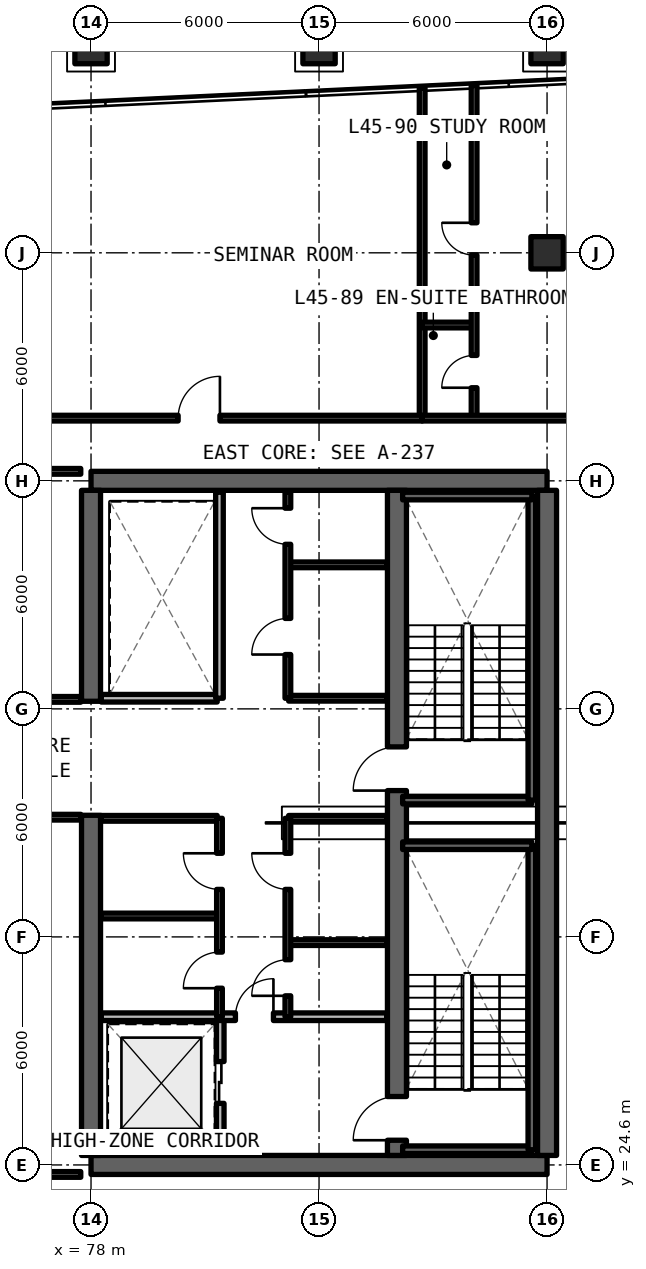
"""IFC4 building model, lengths in metres.
Left out: names, types, materials, properties, quantities, classifications, styles, units other than length and angle.
Written with IfcOpenShell. Run it as: python <this file> out.ifc"""

import sys

from ifc_helpers import new_model, si_unit, direction, frame, frame_2d, origin, origin_2d, place, context, subcontext, project, spatial, rectangle, extrude, element, fill, save


model = new_model("IFC4")
c1 = context("Model", 3, precision=1e-05, world=origin(), true_north=direction((0.0, 1.0)))
c2 = subcontext(c1, "Body", "Model", "MODEL_VIEW")
j1 = project(units=[si_unit("LENGTHUNIT", "METRE"), si_unit("PLANEANGLEUNIT", "RADIAN")], contexts=[c1])
p1 = place(None, origin())
s1 = spatial("IfcSite", under=j1, at=p1, CompositionType="ELEMENT")
p2 = place(p1, origin())
s2 = spatial("IfcBuilding", under=s1, at=p2, CompositionType="ELEMENT")
p3 = place(p2, frame((0.0, 0.0, 162.03)))
s3 = spatial("IfcBuildingStorey", under=s2, at=p3, CompositionType="ELEMENT", Elevation=162.03)
for number, where, z_axis, x_axis in (
    (1, (78.0, 24.6, 0.0), (0.0, 0.0, 1.0), (1.0, 0.0, 0.0)),
    (2, (90.0, 42.6, 0.0), (0.0, 0.0, 1.0), (-1.0, 0.0, 0.0)),
):
    element("IfcWall", number, at=place(p3, frame(where, z_axis=z_axis, x_axis=x_axis)), inside=s3, PredefinedType="SHEAR", context=c2, shape_type="SweptSolid", body=[
        extrude(rectangle(XDim=12.0, YDim=0.5, at=frame_2d((6.0, 0.0))), origin(), (0.0, 0.0, 1.0), 3.63),
    ])
p4 = place(p3, frame((90.0, 24.85, 0.0), z_axis=(0.0, 0.0, 1.0), x_axis=(0.0, 1.0, 0.0)))
e3 = element("IfcWall", 3, at=p4, inside=s3, PredefinedType="SHEAR", context=c2, shape_type="SweptSolid", body=[
    extrude(rectangle(XDim=17.5, YDim=0.5, at=frame_2d((8.75, 0.0))), origin(), (0.0, 0.0, 1.0), 3.63),
])
p5 = place(p3, frame((78.0, 24.85, 0.0), z_axis=(0.0, 0.0, 1.0), x_axis=(0.0, 1.0, 0.0)))
e4 = element("IfcWall", 4, at=p5, inside=s3, PredefinedType="SHEAR", context=c2, shape_type="SweptSolid", body=[
    extrude(rectangle(XDim=8.95, YDim=0.5, at=frame_2d((4.475, 0.0))), origin(), (0.0, 0.0, 1.0), 3.63),
])
p6 = place(p3, frame((78.0, 36.8, 0.0), z_axis=(0.0, 0.0, 1.0), x_axis=(0.0, 1.0, 0.0)))
e5 = element("IfcWall", 5, at=p6, inside=s3, PredefinedType="SHEAR", context=c2, shape_type="SweptSolid", body=[
    extrude(rectangle(XDim=5.55, YDim=0.5, at=frame_2d((2.775, 0.0))), origin(), (0.0, 0.0, 1.0), 3.63),
])
p7 = place(p3, frame((86.05, 24.85, 0.0), z_axis=(0.0, 0.0, 1.0), x_axis=(0.0, 1.0, 0.0)))
e6 = element("IfcWall", 6, at=p7, inside=s3, PredefinedType="SHEAR", context=c2, shape_type="SweptSolid", body=[
    extrude(rectangle(XDim=17.5, YDim=0.5, at=frame_2d((8.75, 0.0))), origin(), (0.0, 0.0, 1.0), 3.63),
])
p8 = place(p7, frame((0.4, 0.0, 0.0)))
e7 = element("IfcOpeningElement", 7, at=p8, cuts=e6, PredefinedType="OPENING", context=c2, shape_type="SweptSolid", body=[
    extrude(rectangle(XDim=1.15, YDim=2.15, at=frame_2d((0.575, 1.075))), frame((0.0, 0.26, 0.0), z_axis=(0.0, -1.0, 0.0), x_axis=(1.0, 0.0, 0.0)), (0.0, 0.0, 1.0), 0.52),
])
p9 = place(p7, frame((9.6, 0.0, 0.0)))
e8 = element("IfcOpeningElement", 8, at=p9, cuts=e6, PredefinedType="OPENING", context=c2, shape_type="SweptSolid", body=[
    extrude(rectangle(XDim=1.15, YDim=2.15, at=frame_2d((0.575, 1.075))), frame((0.0, 0.26, 0.0), z_axis=(0.0, -1.0, 0.0), x_axis=(1.0, 0.0, 0.0)), (0.0, 0.0, 1.0), 0.52),
])
for number, where, z_axis, x_axis in (
    (9, (90.0, 48.6, 0.0), (0.0, 0.0, 1.0), (1.0, 0.0, 0.0)),
    (10, (78.0, 54.0, 0.0), (0.0, 0.0, 1.0), (1.0, 0.0, 0.0)),
    (11, (84.0, 54.0, 0.0), (0.0, 0.0, 1.0), (1.0, 0.0, 0.0)),
    (12, (90.0, 54.0, 0.0), (0.0, 0.0, 1.0), (1.0, 0.0, 0.0)),
):
    element("IfcColumn", number, at=place(p3, frame(where, z_axis=z_axis, x_axis=x_axis)), inside=s3, PredefinedType="COLUMN", context=c2, shape_type="SweptSolid", body=[
        extrude(rectangle(XDim=0.85, YDim=0.85, at=origin_2d()), origin(), (0.0, 0.0, 1.0), 3.63),
    ])
p10 = place(p3, frame((81.4, 24.92, 0.0), z_axis=(0.0, 0.0, 1.0), x_axis=(0.0, 1.0, 0.0)))
e13 = element("IfcWall", 13, at=p10, inside=s3, PredefinedType="SOLIDWALL", context=c2, shape_type="SweptSolid", body=[
    extrude(rectangle(XDim=3.58, YDim=0.2, at=frame_2d((1.79, 0.0))), origin(), (0.0, 0.0, 1.0), 2.63),
])
p11 = place(p10, frame((1.3, 0.0, 0.0)))
e14 = element("IfcOpeningElement", 14, at=p11, cuts=e13, PredefinedType="OPENING", context=c2, shape_type="SweptSolid", body=[
    extrude(rectangle(XDim=1.1, YDim=2.2, at=frame_2d((0.55, 1.1))), frame((0.0, 0.11, 0.0), z_axis=(0.0, -1.0, 0.0), x_axis=(1.0, 0.0, 0.0)), (0.0, 0.0, 1.0), 0.22),
])
p12 = place(p3, frame((78.27, 28.5, 0.0), z_axis=(0.0, 0.0, 1.0), x_axis=(1.0, 0.0, 0.0)))
e15 = element("IfcWall", 15, at=p12, inside=s3, PredefinedType="SOLIDWALL", context=c2, shape_type="SweptSolid", body=[
    extrude(rectangle(XDim=7.51, YDim=0.2, at=frame_2d((3.755, 0.0))), origin(), (0.0, 0.0, 1.0), 2.63),
])
p13 = place(p12, frame((3.53, 0.0, 0.0)))
e16 = element("IfcOpeningElement", 16, at=p13, cuts=e15, PredefinedType="OPENING", context=c2, shape_type="SweptSolid", body=[
    extrude(rectangle(XDim=1.0, YDim=2.15, at=frame_2d((0.5, 1.075))), frame((0.0, 0.11, 0.0), z_axis=(0.0, -1.0, 0.0), x_axis=(1.0, 0.0, 0.0)), (0.0, 0.0, 1.0), 0.22),
])
for number, where, z_axis, x_axis in (
    (17, (83.2, 30.45, 0.0), (0.0, 0.0, 1.0), (1.0, 0.0, 0.0)),
    (18, (83.2, 33.72, 0.0), (0.0, 0.0, 1.0), (1.0, 0.0, 0.0)),
):
    element("IfcWall", number, at=place(p3, frame(where, z_axis=z_axis, x_axis=x_axis)), inside=s3, PredefinedType="SOLIDWALL", context=c2, shape_type="SweptSolid", body=[
        extrude(rectangle(XDim=2.58, YDim=0.15, at=frame_2d((1.29, 0.0))), origin(), (0.0, 0.0, 1.0), 2.63),
    ])
p14 = place(p3, frame((83.18, 28.5, 0.0), z_axis=(0.0, 0.0, 1.0), x_axis=(0.0, 1.0, 0.0)))
e19 = element("IfcWall", 19, at=p14, inside=s3, PredefinedType="SOLIDWALL", context=c2, shape_type="SweptSolid", body=[
    extrude(rectangle(XDim=5.22, YDim=0.15, at=frame_2d((2.61, 0.0))), origin(), (0.0, 0.0, 1.0), 2.63),
])
p15 = place(p14, frame((0.55, 0.0, 0.0)))
e20 = element("IfcOpeningElement", 20, at=p15, cuts=e19, PredefinedType="OPENING", context=c2, shape_type="SweptSolid", body=[
    extrude(rectangle(XDim=0.95, YDim=2.15, at=frame_2d((0.475, 1.075))), frame((0.0, 0.085, 0.0), z_axis=(0.0, -1.0, 0.0), x_axis=(1.0, 0.0, 0.0)), (0.0, 0.0, 1.0), 0.17),
])
p16 = place(p14, frame((3.35, 0.0, 0.0)))
e21 = element("IfcOpeningElement", 21, at=p16, cuts=e19, PredefinedType="OPENING", context=c2, shape_type="SweptSolid", body=[
    extrude(rectangle(XDim=0.95, YDim=2.15, at=frame_2d((0.475, 1.075))), frame((0.0, 0.085, 0.0), z_axis=(0.0, -1.0, 0.0), x_axis=(1.0, 0.0, 0.0)), (0.0, 0.0, 1.0), 0.17),
])
for number, where, z_axis, x_axis in (
    (22, (78.27, 31.15, 0.0), (0.0, 0.0, 1.0), (1.0, 0.0, 0.0)),
    (23, (78.27, 33.72, 0.0), (0.0, 0.0, 1.0), (1.0, 0.0, 0.0)),
):
    element("IfcWall", number, at=place(p3, frame(where, z_axis=z_axis, x_axis=x_axis)), inside=s3, PredefinedType="SOLIDWALL", context=c2, shape_type="SweptSolid", body=[
        extrude(rectangle(XDim=3.05, YDim=0.15, at=frame_2d((1.525, 0.0))), origin(), (0.0, 0.0, 1.0), 2.63),
    ])
p17 = place(p3, frame((81.38, 28.5, 0.0), z_axis=(0.0, 0.0, 1.0), x_axis=(0.0, 1.0, 0.0)))
e24 = element("IfcWall", 24, at=p17, inside=s3, PredefinedType="SOLIDWALL", context=c2, shape_type="SweptSolid", body=[
    extrude(rectangle(XDim=5.22, YDim=0.15, at=frame_2d((2.61, 0.0))), origin(), (0.0, 0.0, 1.0), 2.63),
])
p18 = place(p17, frame((0.75, 0.0, 0.0)))
e25 = element("IfcOpeningElement", 25, at=p18, cuts=e24, PredefinedType="OPENING", context=c2, shape_type="SweptSolid", body=[
    extrude(rectangle(XDim=0.95, YDim=2.15, at=frame_2d((0.475, 1.075))), frame((0.0, 0.085, 0.0), z_axis=(0.0, -1.0, 0.0), x_axis=(1.0, 0.0, 0.0)), (0.0, 0.0, 1.0), 0.17),
])
p19 = place(p17, frame((3.35, 0.0, 0.0)))
e26 = element("IfcOpeningElement", 26, at=p19, cuts=e24, PredefinedType="OPENING", context=c2, shape_type="SweptSolid", body=[
    extrude(rectangle(XDim=0.95, YDim=2.15, at=frame_2d((0.475, 1.075))), frame((0.0, 0.085, 0.0), z_axis=(0.0, -1.0, 0.0), x_axis=(1.0, 0.0, 0.0)), (0.0, 0.0, 1.0), 0.17),
])
for number, where, z_axis, x_axis in (
    (27, (83.2, 36.88, 0.0), (0.0, 0.0, 1.0), (1.0, 0.0, 0.0)),
    (28, (83.2, 40.39, 0.0), (0.0, 0.0, 1.0), (1.0, 0.0, 0.0)),
):
    element("IfcWall", number, at=place(p3, frame(where, z_axis=z_axis, x_axis=x_axis)), inside=s3, PredefinedType="SOLIDWALL", context=c2, shape_type="SweptSolid", body=[
        extrude(rectangle(XDim=2.58, YDim=0.15, at=frame_2d((1.29, 0.0))), origin(), (0.0, 0.0, 1.0), 2.63),
    ])
p20 = place(p3, frame((83.18, 36.88, 0.0), z_axis=(0.0, 0.0, 1.0), x_axis=(0.0, 1.0, 0.0)))
e29 = element("IfcWall", 29, at=p20, inside=s3, PredefinedType="SOLIDWALL", context=c2, shape_type="SweptSolid", body=[
    extrude(rectangle(XDim=5.42, YDim=0.15, at=frame_2d((2.71, 0.0))), origin(), (0.0, 0.0, 1.0), 2.63),
])
p21 = place(p20, frame((1.15, 0.0, 0.0)))
e30 = element("IfcOpeningElement", 30, at=p21, cuts=e29, PredefinedType="OPENING", context=c2, shape_type="SweptSolid", body=[
    extrude(rectangle(XDim=0.95, YDim=2.15, at=frame_2d((0.475, 1.075))), frame((0.0, 0.085, 0.0), z_axis=(0.0, -1.0, 0.0), x_axis=(1.0, 0.0, 0.0)), (0.0, 0.0, 1.0), 0.17),
])
p22 = place(p20, frame((4.05, 0.0, 0.0)))
e31 = element("IfcOpeningElement", 31, at=p22, cuts=e29, PredefinedType="OPENING", context=c2, shape_type="SweptSolid", body=[
    extrude(rectangle(XDim=0.95, YDim=2.15, at=frame_2d((0.475, 1.075))), frame((0.0, 0.085, 0.0), z_axis=(0.0, -1.0, 0.0), x_axis=(1.0, 0.0, 0.0)), (0.0, 0.0, 1.0), 0.17),
])
p23 = place(p3, frame((78.27, 36.88, 0.0), z_axis=(0.0, 0.0, 1.0), x_axis=(1.0, 0.0, 0.0)))
e32 = element("IfcWall", 32, at=p23, inside=s3, PredefinedType="SOLIDWALL", context=c2, shape_type="SweptSolid", body=[
    extrude(rectangle(XDim=3.05, YDim=0.2, at=frame_2d((1.525, 0.0))), origin(), (0.0, 0.0, 1.0), 2.63),
])
p24 = place(p3, frame((81.38, 36.88, 0.0), z_axis=(0.0, 0.0, 1.0), x_axis=(0.0, 1.0, 0.0)))
e33 = element("IfcWall", 33, at=p24, inside=s3, PredefinedType="SOLIDWALL", context=c2, shape_type="SweptSolid", body=[
    extrude(rectangle(XDim=5.42, YDim=0.2, at=frame_2d((2.71, 0.0))), origin(), (0.0, 0.0, 1.0), 2.63),
])
p25 = place(p3, frame((69.85, 24.35, 0.0), z_axis=(0.0, 0.0, 1.0), x_axis=(1.0, 0.0, 0.0)))
e34 = element("IfcWall", 34, at=p25, inside=s3, PredefinedType="SOLIDWALL", context=c2, shape_type="SweptSolid", body=[
    extrude(rectangle(XDim=7.88, YDim=0.15, at=frame_2d((3.94, 0.0))), origin(), (0.0, 0.0, 1.0), 2.63),
])
p26 = place(p3, frame((69.85, 33.75, 0.0), z_axis=(0.0, 0.0, 1.0), x_axis=(1.0, 0.0, 0.0)))
e35 = element("IfcWall", 35, at=p26, inside=s3, PredefinedType="SOLIDWALL", context=c2, shape_type="SweptSolid", body=[
    extrude(rectangle(XDim=7.88, YDim=0.15, at=frame_2d((3.94, 0.0))), origin(), (0.0, 0.0, 1.0), 2.63),
])
p27 = place(p26, frame((3.465, 0.0, 0.0)))
e36 = element("IfcOpeningElement", 36, at=p27, cuts=e35, PredefinedType="OPENING", context=c2, shape_type="SweptSolid", body=[
    extrude(rectangle(XDim=0.95, YDim=2.15, at=frame_2d((0.475, 1.075))), frame((0.0, 0.085, 0.0), z_axis=(0.0, -1.0, 0.0), x_axis=(1.0, 0.0, 0.0)), (0.0, 0.0, 1.0), 0.17),
])
p28 = place(p3, frame((69.85, 36.85, 0.0), z_axis=(0.0, 0.0, 1.0), x_axis=(1.0, 0.0, 0.0)))
e37 = element("IfcWall", 37, at=p28, inside=s3, PredefinedType="SOLIDWALL", context=c2, shape_type="SweptSolid", body=[
    extrude(rectangle(XDim=7.88, YDim=0.15, at=frame_2d((3.94, 0.0))), origin(), (0.0, 0.0, 1.0), 2.63),
])
p29 = place(p28, frame((3.465, 0.0, 0.0)))
e38 = element("IfcOpeningElement", 38, at=p29, cuts=e37, PredefinedType="OPENING", context=c2, shape_type="SweptSolid", body=[
    extrude(rectangle(XDim=0.95, YDim=2.15, at=frame_2d((0.475, 1.075))), frame((0.0, 0.085, 0.0), z_axis=(0.0, -1.0, 0.0), x_axis=(1.0, 0.0, 0.0)), (0.0, 0.0, 1.0), 0.17),
])
p30 = place(p3, frame((69.85, 42.85, 0.0), z_axis=(0.0, 0.0, 1.0), x_axis=(1.0, 0.0, 0.0)))
e39 = element("IfcWall", 39, at=p30, inside=s3, PredefinedType="SOLIDWALL", context=c2, shape_type="SweptSolid", body=[
    extrude(rectangle(XDim=7.88, YDim=0.15, at=frame_2d((3.94, 0.0))), origin(), (0.0, 0.0, 1.0), 2.63),
])
p31 = place(p3, frame((86.714, 44.25, 0.0), z_axis=(0.0, 0.0, 1.0), x_axis=(0.0, 1.0, 0.0)))
e40 = element("IfcWall", 40, at=p31, inside=s3, PredefinedType="SOLIDWALL", context=c2, shape_type="SweptSolid", body=[
    extrude(rectangle(XDim=8.69, YDim=0.15, at=frame_2d((4.345, 0.0))), origin(), (0.0, 0.0, 1.0), 2.63),
])
p32 = place(p3, frame((74.971, 44.25, 0.0), z_axis=(0.0, 0.0, 1.0), x_axis=(1.0, 0.0, 0.0)))
e41 = element("IfcWall", 41, at=p32, inside=s3, PredefinedType="SOLIDWALL", context=c2, shape_type="SweptSolid", body=[
    extrude(rectangle(XDim=11.743, YDim=0.15, at=frame_2d((5.872, 0.0))), origin(), (0.0, 0.0, 1.0), 2.63),
])
p33 = place(p32, frame((5.321, 0.0, 0.0)))
e42 = element("IfcOpeningElement", 42, at=p33, cuts=e41, PredefinedType="OPENING", context=c2, shape_type="SweptSolid", body=[
    extrude(rectangle(XDim=1.1, YDim=2.15, at=frame_2d((0.55, 1.075))), frame((0.0, 0.085, 0.0), z_axis=(0.0, -1.0, 0.0), x_axis=(1.0, 0.0, 0.0)), (0.0, 0.0, 1.0), 0.17),
])
p34 = place(p3, frame((86.714, 46.7, 0.0), z_axis=(0.0, 0.0, 1.0), x_axis=(1.0, 0.0, 0.0)))
e43 = element("IfcWall", 43, at=p34, inside=s3, PredefinedType="PARTITIONING", context=c2, shape_type="SweptSolid", body=[
    extrude(rectangle(XDim=1.366, YDim=0.15, at=frame_2d((0.683, 0.0))), origin(), (0.0, 0.0, 1.0), 2.63),
])
p35 = place(p3, frame((88.08, 44.25, 0.0), z_axis=(0.0, 0.0, 1.0), x_axis=(0.0, 1.0, 0.0)))
e44 = element("IfcWall", 44, at=p35, inside=s3, PredefinedType="PARTITIONING", context=c2, shape_type="SweptSolid", body=[
    extrude(rectangle(XDim=8.755, YDim=0.15, at=frame_2d((4.377, 0.0))), origin(), (0.0, 0.0, 1.0), 2.63),
])
p36 = place(p35, frame((0.8, 0.0, 0.0)))
e45 = element("IfcOpeningElement", 45, at=p36, cuts=e44, PredefinedType="OPENING", context=c2, shape_type="SweptSolid", body=[
    extrude(rectangle(XDim=0.85, YDim=2.1, at=frame_2d((0.425, 1.05))), frame((0.0, 0.085, 0.0), z_axis=(0.0, -1.0, 0.0), x_axis=(1.0, 0.0, 0.0)), (0.0, 0.0, 1.0), 0.17),
])
p37 = place(p35, frame((4.29, 0.0, 0.0)))
e46 = element("IfcOpeningElement", 46, at=p37, cuts=e44, PredefinedType="OPENING", context=c2, shape_type="SweptSolid", body=[
    extrude(rectangle(XDim=0.85, YDim=2.1, at=frame_2d((0.425, 1.05))), frame((0.0, 0.085, 0.0), z_axis=(0.0, -1.0, 0.0), x_axis=(1.0, 0.0, 0.0)), (0.0, 0.0, 1.0), 0.17),
])
p38 = place(p3, frame((86.714, 44.25, 0.0), z_axis=(0.0, 0.0, 1.0), x_axis=(1.0, 0.0, 0.0)))
e47 = element("IfcWall", 47, at=p38, inside=s3, PredefinedType="SOLIDWALL", context=c2, shape_type="SweptSolid", body=[
    extrude(rectangle(XDim=8.886, YDim=0.15, at=frame_2d((4.443, 0.0))), origin(), (0.0, 0.0, 1.0), 2.63),
])
p39 = place(p38, frame((4.691, 0.0, 0.0)))
e48 = element("IfcOpeningElement", 48, at=p39, cuts=e47, PredefinedType="OPENING", context=c2, shape_type="SweptSolid", body=[
    extrude(rectangle(XDim=0.95, YDim=2.15, at=frame_2d((0.475, 1.075))), frame((0.0, 0.085, 0.0), z_axis=(0.0, -1.0, 0.0), x_axis=(1.0, 0.0, 0.0)), (0.0, 0.0, 1.0), 0.17),
])
p40 = place(p3, frame((86.2, 25.0, 0.0), z_axis=(0.0, 0.0, 1.0), x_axis=(1.0, 0.0, 0.0)))
e49 = element("IfcWall", 49, at=p40, inside=s3, PredefinedType="SOLIDWALL", context=c2, shape_type="SweptSolid", body=[
    extrude(rectangle(XDim=3.4, YDim=0.2, at=frame_2d((1.7, 0.0))), origin(), (0.0, 0.0, 1.0), 3.63),
])
p41 = place(p3, frame((89.6, 25.0, 0.0), z_axis=(0.0, 0.0, 1.0), x_axis=(0.0, 1.0, 0.0)))
e50 = element("IfcWall", 50, at=p41, inside=s3, PredefinedType="SOLIDWALL", context=c2, shape_type="SweptSolid", body=[
    extrude(rectangle(XDim=8.0, YDim=0.2, at=frame_2d((4.0, 0.0))), origin(), (0.0, 0.0, 1.0), 3.63),
])
for number, where, z_axis, x_axis in (
    (51, (89.6, 33.0, 0.0), (0.0, 0.0, 1.0), (-1.0, 0.0, 0.0)),
    (52, (86.2, 34.2, 0.0), (0.0, 0.0, 1.0), (1.0, 0.0, 0.0)),
):
    element("IfcWall", number, at=place(p3, frame(where, z_axis=z_axis, x_axis=x_axis)), inside=s3, PredefinedType="SOLIDWALL", context=c2, shape_type="SweptSolid", body=[
        extrude(rectangle(XDim=3.4, YDim=0.2, at=frame_2d((1.7, 0.0))), origin(), (0.0, 0.0, 1.0), 3.63),
    ])
p42 = place(p3, frame((89.6, 34.2, 0.0), z_axis=(0.0, 0.0, 1.0), x_axis=(0.0, 1.0, 0.0)))
e53 = element("IfcWall", 53, at=p42, inside=s3, PredefinedType="SOLIDWALL", context=c2, shape_type="SweptSolid", body=[
    extrude(rectangle(XDim=8.0, YDim=0.2, at=frame_2d((4.0, 0.0))), origin(), (0.0, 0.0, 1.0), 3.63),
])
p43 = place(p3, frame((89.6, 42.2, 0.0), z_axis=(0.0, 0.0, 1.0), x_axis=(-1.0, 0.0, 0.0)))
e54 = element("IfcWall", 54, at=p43, inside=s3, PredefinedType="SOLIDWALL", context=c2, shape_type="SweptSolid", body=[
    extrude(rectangle(XDim=3.4, YDim=0.2, at=frame_2d((1.7, 0.0))), origin(), (0.0, 0.0, 1.0), 3.63),
])
p44 = place(p11, origin())
e55 = element("IfcDoor", 55, at=p44, inside=s3, OperationType="SLIDING_TO_LEFT", PredefinedType="DOOR", context=c2, shape_type="SweptSolid", body=[
    extrude(rectangle(XDim=1.1, YDim=2.2, at=frame_2d((0.55, 1.1))), frame((0.0, 0.025, 0.0), z_axis=(0.0, -1.0, 0.0), x_axis=(1.0, 0.0, 0.0)), (0.0, 0.0, 1.0), 0.05),
])
fill(e14, e55)
p45 = place(p13, origin())
e56 = element("IfcDoor", 56, at=p45, inside=s3, OperationType="SINGLE_SWING_RIGHT", PredefinedType="DOOR", context=c2, shape_type="SweptSolid", body=[
    extrude(rectangle(XDim=1.0, YDim=2.15, at=frame_2d((0.5, 1.075))), frame((0.0, 0.025, 0.0), z_axis=(0.0, -1.0, 0.0), x_axis=(1.0, 0.0, 0.0)), (0.0, 0.0, 1.0), 0.05),
])
fill(e16, e56)
p46 = place(p15, origin())
e57 = element("IfcDoor", 57, at=p46, inside=s3, OperationType="SINGLE_SWING_LEFT", PredefinedType="DOOR", context=c2, shape_type="SweptSolid", body=[
    extrude(rectangle(XDim=0.95, YDim=2.15, at=frame_2d((0.475, 1.075))), frame((0.0, 0.025, 0.0), z_axis=(0.0, -1.0, 0.0), x_axis=(1.0, 0.0, 0.0)), (0.0, 0.0, 1.0), 0.05),
])
fill(e20, e57)
p47 = place(p16, origin())
e58 = element("IfcDoor", 58, at=p47, inside=s3, OperationType="SINGLE_SWING_RIGHT", PredefinedType="DOOR", context=c2, shape_type="SweptSolid", body=[
    extrude(rectangle(XDim=0.95, YDim=2.15, at=frame_2d((0.475, 1.075))), frame((0.0, 0.025, 0.0), z_axis=(0.0, -1.0, 0.0), x_axis=(1.0, 0.0, 0.0)), (0.0, 0.0, 1.0), 0.05),
])
fill(e21, e58)
p48 = place(p18, origin())
e59 = element("IfcDoor", 59, at=p48, inside=s3, OperationType="SINGLE_SWING_LEFT", PredefinedType="DOOR", context=c2, shape_type="SweptSolid", body=[
    extrude(rectangle(XDim=0.95, YDim=2.15, at=frame_2d((0.475, 1.075))), frame((0.0, 0.025, 0.0), z_axis=(0.0, -1.0, 0.0), x_axis=(1.0, 0.0, 0.0)), (0.0, 0.0, 1.0), 0.05),
])
fill(e25, e59)
p49 = place(p19, origin())
e60 = element("IfcDoor", 60, at=p49, inside=s3, OperationType="SINGLE_SWING_RIGHT", PredefinedType="DOOR", context=c2, shape_type="SweptSolid", body=[
    extrude(rectangle(XDim=0.95, YDim=2.15, at=frame_2d((0.475, 1.075))), frame((0.0, 0.025, 0.0), z_axis=(0.0, -1.0, 0.0), x_axis=(1.0, 0.0, 0.0)), (0.0, 0.0, 1.0), 0.05),
])
fill(e26, e60)
p50 = place(p21, origin())
e61 = element("IfcDoor", 61, at=p50, inside=s3, OperationType="SINGLE_SWING_LEFT", PredefinedType="DOOR", context=c2, shape_type="SweptSolid", body=[
    extrude(rectangle(XDim=0.95, YDim=2.15, at=frame_2d((0.475, 1.075))), frame((0.0, 0.025, 0.0), z_axis=(0.0, -1.0, 0.0), x_axis=(1.0, 0.0, 0.0)), (0.0, 0.0, 1.0), 0.05),
])
fill(e30, e61)
p51 = place(p22, origin())
e62 = element("IfcDoor", 62, at=p51, inside=s3, OperationType="SINGLE_SWING_RIGHT", PredefinedType="DOOR", context=c2, shape_type="SweptSolid", body=[
    extrude(rectangle(XDim=0.95, YDim=2.15, at=frame_2d((0.475, 1.075))), frame((0.0, 0.025, 0.0), z_axis=(0.0, -1.0, 0.0), x_axis=(1.0, 0.0, 0.0)), (0.0, 0.0, 1.0), 0.05),
])
fill(e31, e62)
p52 = place(p33, origin())
e63 = element("IfcDoor", 63, at=p52, inside=s3, OperationType="SINGLE_SWING_RIGHT", PredefinedType="DOOR", context=c2, shape_type="SweptSolid", body=[
    extrude(rectangle(XDim=1.1, YDim=2.15, at=frame_2d((0.55, 1.075))), frame((0.0, 0.025, 0.0), z_axis=(0.0, -1.0, 0.0), x_axis=(1.0, 0.0, 0.0)), (0.0, 0.0, 1.0), 0.05),
])
fill(e42, e63)
p53 = place(p36, origin())
e64 = element("IfcDoor", 64, at=p53, inside=s3, OperationType="SINGLE_SWING_LEFT", PredefinedType="DOOR", context=c2, shape_type="SweptSolid", body=[
    extrude(rectangle(XDim=0.85, YDim=2.1, at=frame_2d((0.425, 1.05))), frame((0.0, 0.025, 0.0), z_axis=(0.0, -1.0, 0.0), x_axis=(1.0, 0.0, 0.0)), (0.0, 0.0, 1.0), 0.05),
])
fill(e45, e64)
p54 = place(p37, origin())
e65 = element("IfcDoor", 65, at=p54, inside=s3, OperationType="SINGLE_SWING_RIGHT", PredefinedType="DOOR", context=c2, shape_type="SweptSolid", body=[
    extrude(rectangle(XDim=0.85, YDim=2.1, at=frame_2d((0.425, 1.05))), frame((0.0, 0.025, 0.0), z_axis=(0.0, -1.0, 0.0), x_axis=(1.0, 0.0, 0.0)), (0.0, 0.0, 1.0), 0.05),
])
fill(e46, e65)
p55 = place(p8, origin())
e66 = element("IfcDoor", 66, at=p55, inside=s3, OperationType="SINGLE_SWING_RIGHT", PredefinedType="DOOR", context=c2, shape_type="SweptSolid", body=[
    extrude(rectangle(XDim=1.15, YDim=2.15, at=frame_2d((0.575, 1.075))), frame((0.0, 0.025, 0.0), z_axis=(0.0, -1.0, 0.0), x_axis=(1.0, 0.0, 0.0)), (0.0, 0.0, 1.0), 0.05),
])
fill(e7, e66)
p56 = place(p9, origin())
e67 = element("IfcDoor", 67, at=p56, inside=s3, OperationType="SINGLE_SWING_LEFT", PredefinedType="DOOR", context=c2, shape_type="SweptSolid", body=[
    extrude(rectangle(XDim=1.15, YDim=2.15, at=frame_2d((0.575, 1.075))), frame((0.0, 0.025, 0.0), z_axis=(0.0, -1.0, 0.0), x_axis=(1.0, 0.0, 0.0)), (0.0, 0.0, 1.0), 0.05),
])
fill(e8, e67)
save(model, sys.argv[1])
